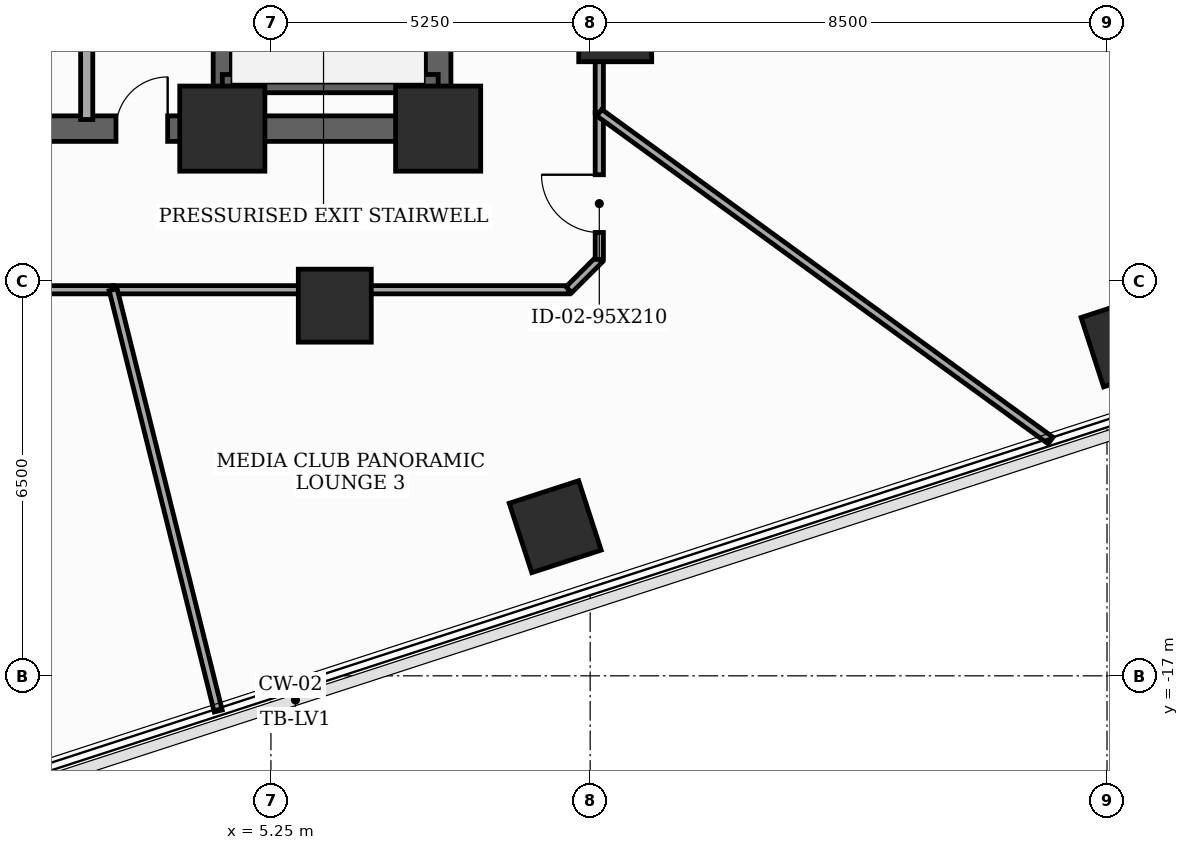
"""IFC4 building model, lengths in metres.
Left out: names, types, materials, properties, quantities, classifications, styles, units other than length and angle.
Written with IfcOpenShell. Run it as: python <this file> out.ifc"""

import sys

from ifc_helpers import new_model, si_unit, direction, frame, frame_2d, origin, origin_2d, place, context, subcontext, project, spatial, rectangle, extrude, element, fill, save


model = new_model("IFC4")
c1 = context("Model", 3, precision=1e-05, world=origin(), true_north=direction((0.0, 1.0)))
c2 = subcontext(c1, "Body", "Model", "MODEL_VIEW")
j1 = project(units=[si_unit("LENGTHUNIT", "METRE"), si_unit("PLANEANGLEUNIT", "RADIAN")], contexts=[c1])
p1 = place(None, origin())
s1 = spatial("IfcSite", under=j1, at=p1, CompositionType="ELEMENT")
p2 = place(p1, origin())
s2 = spatial("IfcBuilding", under=s1, at=p2, CompositionType="ELEMENT")
p3 = place(p2, frame((0.0, 0.0, 116.2)))
s3 = spatial("IfcBuildingStorey", under=s2, at=p3, CompositionType="ELEMENT", Elevation=116.2)
for number, where, z_axis, x_axis in (
    (1, (4.45, -8.0, 0.0), (0.0, 0.0, 1.0), (1.0, 0.0, 0.0)),
    (2, (8.0, -8.0, 0.0), (0.0, 0.0, 1.0), (1.0, 0.0, 0.0)),
):
    element("IfcColumn", number, at=place(p3, frame(where, z_axis=z_axis, x_axis=x_axis)), inside=s3, PredefinedType="COLUMN", context=c2, shape_type="SweptSolid", body=[
        extrude(rectangle(XDim=1.4, YDim=1.4, at=origin_2d()), origin(), (0.0, 0.0, 1.0), 3.7),
    ])
for number, where, z_axis, x_axis in (
    (3, (6.3, -10.912, 0.0), (0.0, 0.0, 1.0), (1.0, 0.0, 0.0)),
    (4, (10.912, -6.3, 0.0), (0.0, 0.0, 1.0), (1.0, 0.0, 0.0)),
    (5, (9.925, -14.547, 0.0), (0.0, 0.0, 1.0), (0.951, 0.309, 0.0)),
    (6, (19.329, -11.491, 0.0), (0.0, 0.0, 1.0), (0.951, 0.309, 0.0)),
):
    element("IfcColumn", number, at=place(p3, frame(where, z_axis=z_axis, x_axis=x_axis)), inside=s3, PredefinedType="COLUMN", context=c2, shape_type="SweptSolid", body=[
        extrude(rectangle(XDim=1.2, YDim=1.2, at=origin_2d()), origin(), (0.0, 0.0, 1.0), 3.7),
    ])
p4 = place(p3, frame((8.0, -8.0, 0.0), z_axis=(0.0, 0.0, 1.0), x_axis=(0.0, 1.0, 0.0)))
e7 = element("IfcWall", 7, at=p4, inside=s3, PredefinedType="SHEAR", context=c2, shape_type="SweptSolid", body=[
    extrude(rectangle(XDim=16.0, YDim=0.42, at=frame_2d((8.0, 0.0))), origin(), (0.0, 0.0, 1.0), 3.5),
])
p5 = place(p4, frame((9.6, 0.0, 0.0)))
e8 = element("IfcOpeningElement", 8, at=p5, cuts=e7, PredefinedType="OPENING", context=c2, shape_type="SweptSolid", body=[
    extrude(rectangle(XDim=1.05, YDim=2.15, at=frame_2d((0.525, 1.075))), frame((0.0, 0.22, 0.0), z_axis=(0.0, -1.0, 0.0), x_axis=(1.0, 0.0, 0.0)), (0.0, 0.0, 1.0), 0.44),
])
p6 = place(p4, frame((14.229, 0.0, 0.0)))
e9 = element("IfcOpeningElement", 9, at=p6, cuts=e7, PredefinedType="OPENING", context=c2, shape_type="SweptSolid", body=[
    extrude(rectangle(XDim=0.85, YDim=2.02, at=frame_2d((0.425, 1.01))), frame((0.0, 0.22, 0.0), z_axis=(0.0, -1.0, 0.0), x_axis=(1.0, 0.0, 0.0)), (0.0, 0.0, 1.0), 0.44),
])
p7 = place(p3, frame((-8.0, -8.0, 0.0), z_axis=(0.0, 0.0, 1.0), x_axis=(1.0, 0.0, 0.0)))
e10 = element("IfcWall", 10, at=p7, inside=s3, PredefinedType="SHEAR", context=c2, shape_type="SweptSolid", body=[
    extrude(rectangle(XDim=16.0, YDim=0.42, at=frame_2d((8.0, 0.0))), origin(), (0.0, 0.0, 1.0), 3.5),
])
p8 = place(p7, frame((4.449, 0.0, 0.0)))
e11 = element("IfcOpeningElement", 11, at=p8, cuts=e10, PredefinedType="OPENING", context=c2, shape_type="SweptSolid", body=[
    extrude(rectangle(XDim=0.85, YDim=2.02, at=frame_2d((0.425, 1.01))), frame((0.0, 0.22, 0.0), z_axis=(0.0, -1.0, 0.0), x_axis=(1.0, 0.0, 0.0)), (0.0, 0.0, 1.0), 0.44),
])
p9 = place(p7, frame((6.49, 0.0, 0.0)))
e12 = element("IfcOpeningElement", 12, at=p9, cuts=e10, PredefinedType="OPENING", context=c2, shape_type="SweptSolid", body=[
    extrude(rectangle(XDim=0.85, YDim=2.02, at=frame_2d((0.425, 1.01))), frame((0.0, 0.22, 0.0), z_axis=(0.0, -1.0, 0.0), x_axis=(1.0, 0.0, 0.0)), (0.0, 0.0, 1.0), 0.44),
])
p10 = place(p7, frame((8.69, 0.0, 0.0)))
e13 = element("IfcOpeningElement", 13, at=p10, cuts=e10, PredefinedType="OPENING", context=c2, shape_type="SweptSolid", body=[
    extrude(rectangle(XDim=0.85, YDim=2.02, at=frame_2d((0.425, 1.01))), frame((0.0, 0.22, 0.0), z_axis=(0.0, -1.0, 0.0), x_axis=(1.0, 0.0, 0.0)), (0.0, 0.0, 1.0), 0.44),
])
p11 = place(p7, frame((10.701, 0.0, 0.0)))
e14 = element("IfcOpeningElement", 14, at=p11, cuts=e10, PredefinedType="OPENING", context=c2, shape_type="SweptSolid", body=[
    extrude(rectangle(XDim=0.85, YDim=2.02, at=frame_2d((0.425, 1.01))), frame((0.0, 0.22, 0.0), z_axis=(0.0, -1.0, 0.0), x_axis=(1.0, 0.0, 0.0)), (0.0, 0.0, 1.0), 0.44),
])
p12 = place(p3, frame((4.45, -7.79, 0.0), z_axis=(0.0, 0.0, 1.0), x_axis=(0.0, 1.0, 0.0)))
e15 = element("IfcWall", 15, at=p12, inside=s3, PredefinedType="SHEAR", context=c2, shape_type="SweptSolid", body=[
    extrude(rectangle(XDim=15.58, YDim=0.3, at=frame_2d((7.79, 0.0))), origin(), (0.0, 0.0, 1.0), 3.5),
])
p13 = place(p3, frame((4.45, -7.26, 0.0), z_axis=(0.0, 0.0, 1.0), x_axis=(1.0, 0.0, 0.0)))
e16 = element("IfcWall", 16, at=p13, inside=s3, PredefinedType="SHEAR", context=c2, shape_type="SweptSolid", body=[
    extrude(rectangle(XDim=3.55, YDim=0.3, at=frame_2d((1.775, 0.0))), origin(), (0.0, 0.0, 1.0), 3.5),
])
p14 = place(p3, frame((2.22, -7.85, 0.0), z_axis=(0.0, 0.0, 1.0), x_axis=(0.0, 1.0, 0.0)))
e17 = element("IfcWall", 17, at=p14, inside=s3, PredefinedType="SOLIDWALL", context=c2, shape_type="SweptSolid", body=[
    extrude(rectangle(XDim=2.95, YDim=0.2, at=frame_2d((1.475, 0.0))), origin(), (0.0, 0.0, 1.0), 2.885),
])
p15 = place(p3, frame((10.65, -7.738, 0.0), z_axis=(0.0, 0.0, 1.0), x_axis=(0.0, 1.0, 0.0)))
e18 = element("IfcWall", 18, at=p15, inside=s3, PredefinedType="PARTITIONING", context=c2, shape_type="SweptSolid", body=[
    extrude(rectangle(XDim=3.746, YDim=0.135, at=frame_2d((1.873, 0.0))), origin(), (0.0, 0.0, 1.0), 2.085),
])
p16 = place(p3, frame((10.65, -3.992, 0.0), z_axis=(0.0, 0.0, 1.0), x_axis=(0.965906888357, -0.258889712088, 0.0)))
e19 = element("IfcWall", 19, at=p16, inside=s3, PredefinedType="PARTITIONING", context=c2, shape_type="SweptSolid", body=[
    extrude(rectangle(XDim=11.28, YDim=0.135, at=frame_2d((5.64, 0.0))), origin(), (0.0, 0.0, 1.0), 2.085),
])
p17 = place(p3, frame((-1.715, -10.65, 0.0), z_axis=(0.0, 0.0, 1.0), x_axis=(1.0, 0.0, 0.0)))
e20 = element("IfcWall", 20, at=p17, inside=s3, PredefinedType="PARTITIONING", context=c2, shape_type="SweptSolid", body=[
    extrude(rectangle(XDim=4.37, YDim=0.135, at=frame_2d((2.185, 0.0))), origin(), (0.0, 0.0, 1.0), 2.785),
])
p18 = place(p3, frame((2.655, -10.65, 0.0), z_axis=(0.0, 0.0, 1.0), x_axis=(1.0, 0.0, 0.0)))
e21 = element("IfcWall", 21, at=p18, inside=s3, PredefinedType="PARTITIONING", context=c2, shape_type="SweptSolid", body=[
    extrude(rectangle(XDim=7.495, YDim=0.135, at=frame_2d((3.748, 0.0))), origin(), (0.0, 0.0, 1.0), 2.085),
])
p19 = place(p3, frame((10.15, -10.65, 0.0), z_axis=(0.0, 0.0, 1.0), x_axis=(0.707106781187, 0.707106781187, 0.0)))
e22 = element("IfcWall", 22, at=p19, inside=s3, PredefinedType="PARTITIONING", context=c2, shape_type="SweptSolid", body=[
    extrude(rectangle(XDim=0.707, YDim=0.135, at=frame_2d((0.354, 0.0))), origin(), (0.0, 0.0, 1.0), 3.5),
])
p20 = place(p3, frame((10.65, -10.15, 0.0), z_axis=(0.0, 0.0, 1.0), x_axis=(0.0, 1.0, 0.0)))
e23 = element("IfcWall", 23, at=p20, inside=s3, PredefinedType="PARTITIONING", context=c2, shape_type="SweptSolid", body=[
    extrude(rectangle(XDim=2.412, YDim=0.135, at=frame_2d((1.206, 0.0))), origin(), (0.0, 0.0, 1.0), 3.5),
])
p21 = place(p20, frame((0.442, 0.0, 0.0)))
e24 = element("IfcOpeningElement", 24, at=p21, cuts=e23, PredefinedType="OPENING", context=c2, shape_type="SweptSolid", body=[
    extrude(rectangle(XDim=0.95, YDim=2.1, at=frame_2d((0.475, 1.05))), frame((0.0, 0.077, 0.0), z_axis=(0.0, -1.0, 0.0), x_axis=(1.0, 0.0, 0.0)), (0.0, 0.0, 1.0), 0.155),
])
p22 = place(p3, frame((10.65, -7.738, 0.0), z_axis=(0.0, 0.0, 1.0), x_axis=(0.809037487075, -0.587757045477, 0.0)))
e25 = element("IfcWall", 25, at=p22, inside=s3, PredefinedType="PARTITIONING", context=c2, shape_type="SweptSolid", body=[
    extrude(rectangle(XDim=9.174, YDim=0.135, at=frame_2d((4.587, 0.0))), origin(), (0.0, 0.0, 1.0), 2.085),
])
p23 = place(p3, frame((4.383, -17.578, 0.0), z_axis=(0.0, 0.0, 1.0), x_axis=(-0.241972431949, 0.970283124751, 0.0)))
e26 = element("IfcWall", 26, at=p23, inside=s3, PredefinedType="PARTITIONING", context=c2, shape_type="SweptSolid", body=[
    extrude(rectangle(XDim=7.14, YDim=0.135, at=frame_2d((3.57, 0.0))), origin(), (0.0, 0.0, 1.0), 2.085),
])
p24 = place(p11, origin())
e27 = element("IfcDoor", 27, at=p24, inside=s3, OperationType="SINGLE_SWING_RIGHT", PredefinedType="TRAPDOOR", context=c2, shape_type="SweptSolid", body=[
    extrude(rectangle(XDim=0.85, YDim=2.02, at=frame_2d((0.425, 1.01))), frame((0.0, 0.025, 0.0), z_axis=(0.0, -1.0, 0.0), x_axis=(1.0, 0.0, 0.0)), (0.0, 0.0, 1.0), 0.05),
])
fill(e14, e27)
p25 = place(p21, origin())
e28 = element("IfcDoor", 28, at=p25, inside=s3, OperationType="SINGLE_SWING_RIGHT", PredefinedType="DOOR", context=c2, shape_type="SweptSolid", body=[
    extrude(rectangle(XDim=0.95, YDim=2.1, at=frame_2d((0.475, 1.05))), frame((0.0, 0.025, 0.0), z_axis=(0.0, -1.0, 0.0), x_axis=(1.0, 0.0, 0.0)), (0.0, 0.0, 1.0), 0.05),
])
fill(e24, e28)
save(model, sys.argv[1])
